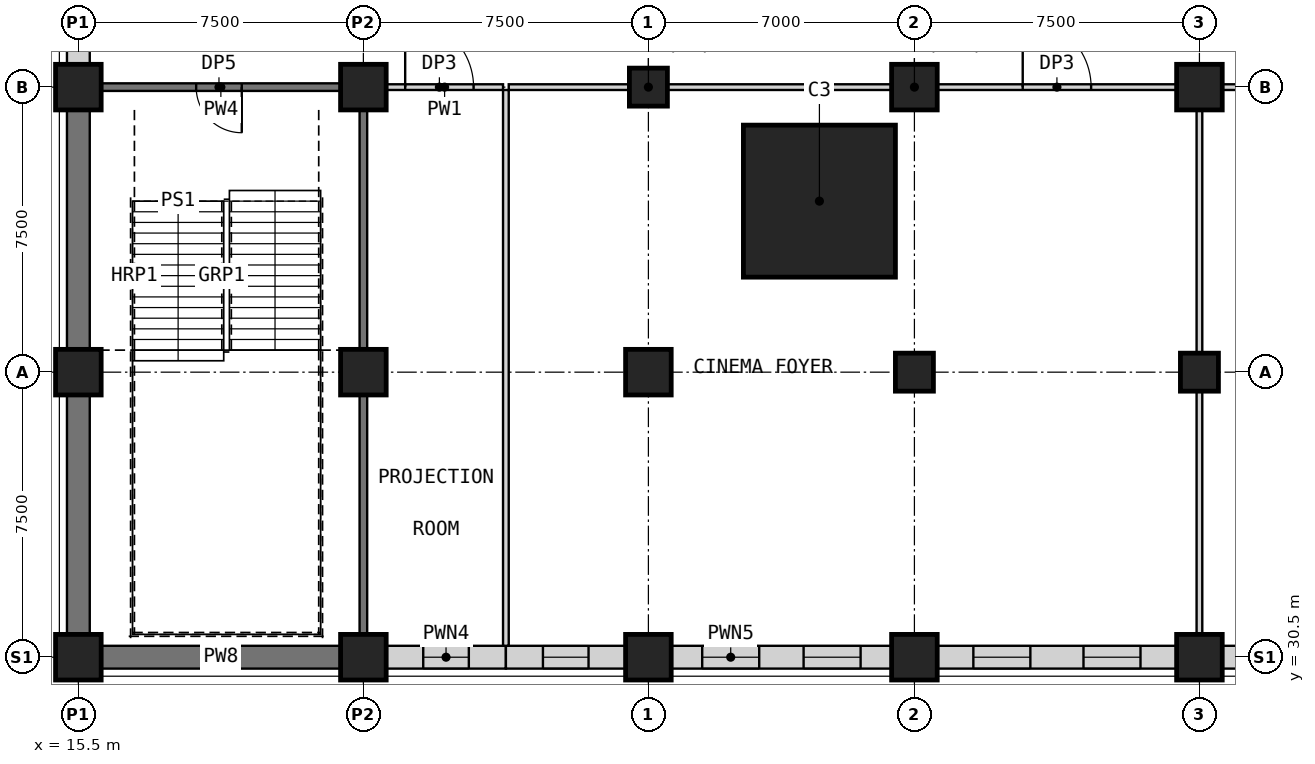
"""IFC4 building model, lengths in metres.
Left out: names, types, materials, properties, quantities, classifications, styles, units other than length and angle.
Written with IfcOpenShell. Run it as: python <this file> out.ifc"""

import sys

from ifc_helpers import new_model, si_unit, direction, frame, frame_2d, origin, origin_2d, place, context, subcontext, project, spatial, rectangle, extrude, element, fill, save


model = new_model("IFC4")
c1 = context("Model", 3, precision=1e-05, world=origin(), true_north=direction((0.0, 1.0)))
c2 = subcontext(c1, "Body", "Model", "MODEL_VIEW")
j1 = project(units=[si_unit("LENGTHUNIT", "METRE"), si_unit("PLANEANGLEUNIT", "RADIAN")], contexts=[c1])
p1 = place(None, origin())
s1 = spatial("IfcSite", under=j1, at=p1, CompositionType="ELEMENT")
p2 = place(p1, origin())
s2 = spatial("IfcBuilding", under=s1, at=p2, CompositionType="ELEMENT")
p3 = place(p2, frame((0.0, 0.0, 18.5)))
s3 = spatial("IfcBuildingStorey", under=s2, at=p3, CompositionType="ELEMENT", Elevation=18.5)
for number, where, z_axis, x_axis in (
    (1, (30.5, 45.5, 0.0), (0.0, 0.0, 1.0), (1.0, 0.0, 0.0)),
    (2, (37.5, 38.0, 0.0), (0.0, 0.0, 1.0), (1.0, 0.0, 0.0)),
):
    element("IfcColumn", number, at=place(p3, frame(where, z_axis=z_axis, x_axis=x_axis)), inside=s3, PredefinedType="COLUMN", context=c2, shape_type="SweptSolid", body=[
        extrude(rectangle(XDim=1.0, YDim=1.0, at=origin_2d()), origin(), (0.0, 0.0, 1.0), 5.0),
    ])
p4 = place(p3, frame((37.5, 45.5, 0.0), z_axis=(0.0, 0.0, 1.0), x_axis=(1.0, 0.0, 0.0)))
e3 = element("IfcColumn", 3, at=p4, inside=s3, PredefinedType="COLUMN", context=c2, shape_type="SweptSolid", body=[
    extrude(rectangle(XDim=1.2, YDim=1.2, at=origin_2d()), origin(), (0.0, 0.0, 1.0), 5.0),
])
p5 = place(p3, frame((45.0, 38.0, 0.0), z_axis=(0.0, 0.0, 1.0), x_axis=(1.0, 0.0, 0.0)))
e4 = element("IfcColumn", 4, at=p5, inside=s3, PredefinedType="COLUMN", context=c2, shape_type="SweptSolid", body=[
    extrude(rectangle(XDim=1.0, YDim=1.0, at=origin_2d()), origin(), (0.0, 0.0, 1.0), 5.0),
])
p6 = place(p3, frame((45.0, 45.5, 0.0), z_axis=(0.0, 0.0, 1.0), x_axis=(1.0, 0.0, 0.0)))
e5 = element("IfcColumn", 5, at=p6, inside=s3, PredefinedType="COLUMN", context=c2, shape_type="SweptSolid", body=[
    extrude(rectangle(XDim=1.2, YDim=1.2, at=origin_2d()), origin(), (0.0, 0.0, 1.0), 5.0),
])
p7 = place(p3, frame((35.0, 42.5, 0.0), z_axis=(0.0, 0.0, 1.0), x_axis=(1.0, 0.0, 0.0)))
e6 = element("IfcColumn", 6, at=p7, inside=s3, PredefinedType="COLUMN", context=c2, shape_type="SweptSolid", body=[
    extrude(rectangle(XDim=4.0, YDim=4.0, at=origin_2d()), origin(), (0.0, 0.0, 1.0), 5.0),
])
for number, where, z_axis, x_axis in (
    (7, (15.5, 30.5, 0.0), (0.0, 0.0, 1.0), (1.0, 0.0, 0.0)),
    (8, (15.5, 38.0, 0.0), (0.0, 0.0, 1.0), (1.0, 0.0, 0.0)),
    (9, (15.5, 45.5, 0.0), (0.0, 0.0, 1.0), (1.0, 0.0, 0.0)),
    (10, (23.0, 30.5, 0.0), (0.0, 0.0, 1.0), (1.0, 0.0, 0.0)),
    (11, (23.0, 38.0, 0.0), (0.0, 0.0, 1.0), (1.0, 0.0, 0.0)),
    (12, (23.0, 45.5, 0.0), (0.0, 0.0, 1.0), (1.0, 0.0, 0.0)),
    (13, (30.5, 30.5, 0.0), (0.0, 0.0, 1.0), (1.0, 0.0, 0.0)),
    (14, (30.5, 38.0, 0.0), (0.0, 0.0, 1.0), (1.0, 0.0, 0.0)),
    (15, (37.5, 30.5, 0.0), (0.0, 0.0, 1.0), (1.0, 0.0, 0.0)),
    (16, (45.0, 30.5, 0.0), (0.0, 0.0, 1.0), (1.0, 0.0, 0.0)),
):
    element("IfcColumn", number, at=place(p3, frame(where, z_axis=z_axis, x_axis=x_axis)), inside=s3, PredefinedType="COLUMN", context=c2, shape_type="SweptSolid", body=[
        extrude(rectangle(XDim=1.2, YDim=1.2, at=origin_2d()), origin(), (0.0, 0.0, 1.0), 5.0),
    ])
p8 = place(p3, frame((16.1, 30.5, 0.0), z_axis=(0.0, 0.0, 1.0), x_axis=(1.0, 0.0, 0.0)))
e17 = element("IfcWall", 17, at=p8, inside=s3, PredefinedType="PARTITIONING", context=c2, shape_type="SweptSolid", body=[
    extrude(rectangle(XDim=6.3, YDim=0.6, at=frame_2d((3.15, 0.0))), origin(), (0.0, 0.0, 1.0), 4.1),
])
p9 = place(p3, frame((23.6, 30.5, 0.0), z_axis=(0.0, 0.0, 1.0), x_axis=(1.0, 0.0, 0.0)))
e18 = element("IfcWall", 18, at=p9, inside=s3, PredefinedType="PARTITIONING", context=c2, shape_type="SweptSolid", body=[
    extrude(rectangle(XDim=3.15, YDim=0.6, at=frame_2d((1.575, 0.0))), origin(), (0.0, 0.0, 1.0), 4.1),
])
p10 = place(p9, frame((0.975, 0.0, 0.9)))
e19 = element("IfcOpeningElement", 19, at=p10, cuts=e18, PredefinedType="OPENING", context=c2, shape_type="SweptSolid", body=[
    extrude(rectangle(XDim=1.2, YDim=2.8, at=frame_2d((0.6, 1.4))), frame((0.0, 0.31, 0.0), z_axis=(0.0, -1.0, 0.0), x_axis=(1.0, 0.0, 0.0)), (0.0, 0.0, 1.0), 0.62),
])
p11 = place(p3, frame((26.75, 30.5, 0.0), z_axis=(0.0, 0.0, 1.0), x_axis=(1.0, 0.0, 0.0)))
e20 = element("IfcWall", 20, at=p11, inside=s3, PredefinedType="PARTITIONING", context=c2, shape_type="SweptSolid", body=[
    extrude(rectangle(XDim=3.15, YDim=0.6, at=frame_2d((1.575, 0.0))), origin(), (0.0, 0.0, 1.0), 4.1),
])
p12 = place(p11, frame((0.975, 0.0, 0.9)))
e21 = element("IfcOpeningElement", 21, at=p12, cuts=e20, PredefinedType="OPENING", context=c2, shape_type="SweptSolid", body=[
    extrude(rectangle(XDim=1.2, YDim=2.8, at=frame_2d((0.6, 1.4))), frame((0.0, 0.31, 0.0), z_axis=(0.0, -1.0, 0.0), x_axis=(1.0, 0.0, 0.0)), (0.0, 0.0, 1.0), 0.62),
])
p13 = place(p3, frame((31.1, 30.5, 0.0), z_axis=(0.0, 0.0, 1.0), x_axis=(1.0, 0.0, 0.0)))
e22 = element("IfcWall", 22, at=p13, inside=s3, PredefinedType="PARTITIONING", context=c2, shape_type="SweptSolid", body=[
    extrude(rectangle(XDim=5.8, YDim=0.6, at=frame_2d((2.9, 0.0))), origin(), (0.0, 0.0, 1.0), 4.1),
])
p14 = place(p13, frame((0.816, 0.0, 0.9)))
e23 = element("IfcOpeningElement", 23, at=p14, cuts=e22, PredefinedType="OPENING", context=c2, shape_type="SweptSolid", body=[
    extrude(rectangle(XDim=1.5, YDim=2.8, at=frame_2d((0.75, 1.4))), frame((0.0, 0.31, 0.0), z_axis=(0.0, -1.0, 0.0), x_axis=(1.0, 0.0, 0.0)), (0.0, 0.0, 1.0), 0.62),
])
p15 = place(p13, frame((3.484, 0.0, 0.9)))
e24 = element("IfcOpeningElement", 24, at=p15, cuts=e22, PredefinedType="OPENING", context=c2, shape_type="SweptSolid", body=[
    extrude(rectangle(XDim=1.5, YDim=2.8, at=frame_2d((0.75, 1.4))), frame((0.0, 0.31, 0.0), z_axis=(0.0, -1.0, 0.0), x_axis=(1.0, 0.0, 0.0)), (0.0, 0.0, 1.0), 0.62),
])
p16 = place(p3, frame((38.1, 30.5, 0.0), z_axis=(0.0, 0.0, 1.0), x_axis=(1.0, 0.0, 0.0)))
e25 = element("IfcWall", 25, at=p16, inside=s3, PredefinedType="PARTITIONING", context=c2, shape_type="SweptSolid", body=[
    extrude(rectangle(XDim=6.3, YDim=0.6, at=frame_2d((3.15, 0.0))), origin(), (0.0, 0.0, 1.0), 4.1),
])
p17 = place(p16, frame((0.951, 0.0, 0.9)))
e26 = element("IfcOpeningElement", 26, at=p17, cuts=e25, PredefinedType="OPENING", context=c2, shape_type="SweptSolid", body=[
    extrude(rectangle(XDim=1.5, YDim=2.8, at=frame_2d((0.75, 1.4))), frame((0.0, 0.31, 0.0), z_axis=(0.0, -1.0, 0.0), x_axis=(1.0, 0.0, 0.0)), (0.0, 0.0, 1.0), 0.62),
])
p18 = place(p16, frame((3.849, 0.0, 0.9)))
e27 = element("IfcOpeningElement", 27, at=p18, cuts=e25, PredefinedType="OPENING", context=c2, shape_type="SweptSolid", body=[
    extrude(rectangle(XDim=1.5, YDim=2.8, at=frame_2d((0.75, 1.4))), frame((0.0, 0.31, 0.0), z_axis=(0.0, -1.0, 0.0), x_axis=(1.0, 0.0, 0.0)), (0.0, 0.0, 1.0), 0.62),
])
p19 = place(p3, frame((45.6, 30.5, 0.0), z_axis=(0.0, 0.0, 1.0), x_axis=(1.0, 0.0, 0.0)))
e28 = element("IfcWall", 28, at=p19, inside=s3, PredefinedType="PARTITIONING", context=c2, shape_type="SweptSolid", body=[
    extrude(rectangle(XDim=6.3, YDim=0.6, at=frame_2d((3.15, 0.0))), origin(), (0.0, 0.0, 1.0), 4.1),
])
p20 = place(p19, frame((0.951, 0.0, 0.9)))
e29 = element("IfcOpeningElement", 29, at=p20, cuts=e28, PredefinedType="OPENING", context=c2, shape_type="SweptSolid", body=[
    extrude(rectangle(XDim=1.5, YDim=2.8, at=frame_2d((0.75, 1.4))), frame((0.0, 0.31, 0.0), z_axis=(0.0, -1.0, 0.0), x_axis=(1.0, 0.0, 0.0)), (0.0, 0.0, 1.0), 0.62),
])
p21 = place(p19, frame((3.849, 0.0, 0.9)))
e30 = element("IfcOpeningElement", 30, at=p21, cuts=e28, PredefinedType="OPENING", context=c2, shape_type="SweptSolid", body=[
    extrude(rectangle(XDim=1.5, YDim=2.8, at=frame_2d((0.75, 1.4))), frame((0.0, 0.31, 0.0), z_axis=(0.0, -1.0, 0.0), x_axis=(1.0, 0.0, 0.0)), (0.0, 0.0, 1.0), 0.62),
])
p22 = place(p3, frame((22.4, 45.5, 0.0), z_axis=(0.0, 0.0, 1.0), x_axis=(-1.0, 0.0, 0.0)))
e31 = element("IfcWall", 31, at=p22, inside=s3, PredefinedType="SHEAR", context=c2, shape_type="SweptSolid", body=[
    extrude(rectangle(XDim=6.3, YDim=0.2, at=frame_2d((3.15, 0.0))), origin(), (0.0, 0.0, 1.0), 4.7),
])
p23 = place(p22, frame((2.6, 0.0, 0.0)))
e32 = element("IfcOpeningElement", 32, at=p23, cuts=e31, PredefinedType="OPENING", context=c2, shape_type="SweptSolid", body=[
    extrude(rectangle(XDim=1.2, YDim=2.1, at=frame_2d((0.6, 1.05))), frame((0.0, 0.11, 0.0), z_axis=(0.0, -1.0, 0.0), x_axis=(1.0, 0.0, 0.0)), (0.0, 0.0, 1.0), 0.22),
])
p24 = place(p3, frame((23.6, 45.5, 0.0), z_axis=(0.0, 0.0, 1.0), x_axis=(1.0, 0.0, 0.0)))
e33 = element("IfcWall", 33, at=p24, inside=s3, PredefinedType="PARTITIONING", context=c2, shape_type="SweptSolid", body=[
    extrude(rectangle(XDim=3.075, YDim=0.15, at=frame_2d((1.538, 0.0))), origin(), (0.0, 0.0, 1.0), 4.7),
])
p25 = place(p24, frame((0.5, 0.0, 0.0)))
e34 = element("IfcOpeningElement", 34, at=p25, cuts=e33, PredefinedType="OPENING", context=c2, shape_type="SweptSolid", body=[
    extrude(rectangle(XDim=1.8, YDim=2.4, at=frame_2d((0.9, 1.2))), frame((0.0, 0.085, 0.0), z_axis=(0.0, -1.0, 0.0), x_axis=(1.0, 0.0, 0.0)), (0.0, 0.0, 1.0), 0.17),
])
p26 = place(p3, frame((26.825, 45.5, 0.0), z_axis=(0.0, 0.0, 1.0), x_axis=(1.0, 0.0, 0.0)))
e35 = element("IfcWall", 35, at=p26, inside=s3, PredefinedType="PARTITIONING", context=c2, shape_type="SweptSolid", body=[
    extrude(rectangle(XDim=3.175, YDim=0.15, at=frame_2d((1.587, 0.0))), origin(), (0.0, 0.0, 1.0), 4.7),
])
p27 = place(p3, frame((31.0, 45.5, 0.0), z_axis=(0.0, 0.0, 1.0), x_axis=(1.0, 0.0, 0.0)))
e36 = element("IfcWall", 36, at=p27, inside=s3, PredefinedType="PARTITIONING", context=c2, shape_type="SweptSolid", body=[
    extrude(rectangle(XDim=5.9, YDim=0.15, at=frame_2d((2.95, 0.0))), origin(), (0.0, 0.0, 1.0), 4.7),
])
p28 = place(p3, frame((38.1, 45.5, 0.0), z_axis=(0.0, 0.0, 1.0), x_axis=(1.0, 0.0, 0.0)))
e37 = element("IfcWall", 37, at=p28, inside=s3, PredefinedType="PARTITIONING", context=c2, shape_type="SweptSolid", body=[
    extrude(rectangle(XDim=6.3, YDim=0.15, at=frame_2d((3.15, 0.0))), origin(), (0.0, 0.0, 1.0), 4.7),
])
p29 = place(p28, frame((2.25, 0.0, 0.0)))
e38 = element("IfcOpeningElement", 38, at=p29, cuts=e37, PredefinedType="OPENING", context=c2, shape_type="SweptSolid", body=[
    extrude(rectangle(XDim=1.8, YDim=2.4, at=frame_2d((0.9, 1.2))), frame((0.0, 0.085, 0.0), z_axis=(0.0, -1.0, 0.0), x_axis=(1.0, 0.0, 0.0)), (0.0, 0.0, 1.0), 0.17),
])
p30 = place(p3, frame((45.6, 45.5, 0.0), z_axis=(0.0, 0.0, 1.0), x_axis=(1.0, 0.0, 0.0)))
e39 = element("IfcWall", 39, at=p30, inside=s3, PredefinedType="PARTITIONING", context=c2, shape_type="SweptSolid", body=[
    extrude(rectangle(XDim=6.3, YDim=0.15, at=frame_2d((3.15, 0.0))), origin(), (0.0, 0.0, 1.0), 4.7),
])
p31 = place(p30, frame((4.0, 0.0, 0.0)))
e40 = element("IfcOpeningElement", 40, at=p31, cuts=e39, PredefinedType="OPENING", context=c2, shape_type="SweptSolid", body=[
    extrude(rectangle(XDim=1.8, YDim=2.4, at=frame_2d((0.9, 1.2))), frame((0.0, 0.085, 0.0), z_axis=(0.0, -1.0, 0.0), x_axis=(1.0, 0.0, 0.0)), (0.0, 0.0, 1.0), 0.17),
])
for number, where, z_axis, x_axis in (
    (41, (15.5, 31.1, 0.0), (0.0, 0.0, 1.0), (0.0, 1.0, 0.0)),
    (42, (15.5, 38.6, 0.0), (0.0, 0.0, 1.0), (0.0, 1.0, 0.0)),
):
    element("IfcWall", number, at=place(p3, frame(where, z_axis=z_axis, x_axis=x_axis)), inside=s3, PredefinedType="PARTITIONING", context=c2, shape_type="SweptSolid", body=[
        extrude(rectangle(XDim=6.3, YDim=0.6, at=frame_2d((3.15, 0.0))), origin(), (0.0, 0.0, 1.0), 4.1),
    ])
p32 = place(p3, frame((15.5, 46.1, 0.0), z_axis=(0.0, 0.0, 1.0), x_axis=(0.0, 1.0, 0.0)))
e43 = element("IfcWall", 43, at=p32, inside=s3, PredefinedType="PARTITIONING", context=c2, shape_type="SweptSolid", body=[
    extrude(rectangle(XDim=5.8, YDim=0.6, at=frame_2d((2.9, 0.0))), origin(), (0.0, 0.0, 1.0), 4.1),
])
p33 = place(p32, frame((0.816, 0.0, 0.9)))
e44 = element("IfcOpeningElement", 44, at=p33, cuts=e43, PredefinedType="OPENING", context=c2, shape_type="SweptSolid", body=[
    extrude(rectangle(XDim=1.5, YDim=2.8, at=frame_2d((0.75, 1.4))), frame((0.0, 0.31, 0.0), z_axis=(0.0, -1.0, 0.0), x_axis=(1.0, 0.0, 0.0)), (0.0, 0.0, 1.0), 0.62),
])
p34 = place(p32, frame((3.484, 0.0, 0.9)))
e45 = element("IfcOpeningElement", 45, at=p34, cuts=e43, PredefinedType="OPENING", context=c2, shape_type="SweptSolid", body=[
    extrude(rectangle(XDim=1.5, YDim=2.8, at=frame_2d((0.75, 1.4))), frame((0.0, 0.31, 0.0), z_axis=(0.0, -1.0, 0.0), x_axis=(1.0, 0.0, 0.0)), (0.0, 0.0, 1.0), 0.62),
])
for number, where, z_axis, x_axis in (
    (46, (23.0, 31.1, 0.0), (0.0, 0.0, 1.0), (0.0, 1.0, 0.0)),
    (47, (23.0, 38.6, 0.0), (0.0, 0.0, 1.0), (0.0, 1.0, 0.0)),
):
    element("IfcWall", number, at=place(p3, frame(where, z_axis=z_axis, x_axis=x_axis)), inside=s3, PredefinedType="SHEAR", context=c2, shape_type="SweptSolid", body=[
        extrude(rectangle(XDim=6.3, YDim=0.2, at=frame_2d((3.15, 0.0))), origin(), (0.0, 0.0, 1.0), 4.7),
    ])
p35 = place(p3, frame((26.75, 30.8, 0.0), z_axis=(0.0, 0.0, 1.0), x_axis=(0.0, 1.0, 0.0)))
e48 = element("IfcWall", 48, at=p35, inside=s3, PredefinedType="PARTITIONING", context=c2, shape_type="SweptSolid", body=[
    extrude(rectangle(XDim=14.625, YDim=0.15, at=frame_2d((7.312, 0.0))), origin(), (0.0, 0.0, 1.0), 4.7),
])
for number, where, z_axis, x_axis in (
    (49, (45.0, 31.1, 0.0), (0.0, 0.0, 1.0), (0.0, 1.0, 0.0)),
    (50, (45.0, 38.5, 0.0), (0.0, 0.0, 1.0), (0.0, 1.0, 0.0)),
):
    element("IfcWall", number, at=place(p3, frame(where, z_axis=z_axis, x_axis=x_axis)), inside=s3, PredefinedType="PARTITIONING", context=c2, shape_type="SweptSolid", body=[
        extrude(rectangle(XDim=6.4, YDim=0.15, at=frame_2d((3.2, 0.0))), origin(), (0.0, 0.0, 1.0), 4.7),
    ])
p36 = place(p10, origin())
e51 = element("IfcWindow", 51, at=p36, inside=s3, PartitioningType="SINGLE_PANEL", PredefinedType="WINDOW", context=c2, shape_type="SweptSolid", body=[
    extrude(rectangle(XDim=1.2, YDim=2.8, at=frame_2d((0.6, 1.4))), frame((0.0, 0.03, 0.0), z_axis=(0.0, -1.0, 0.0), x_axis=(1.0, 0.0, 0.0)), (0.0, 0.0, 1.0), 0.06),
])
fill(e19, e51)
p37 = place(p12, origin())
e52 = element("IfcWindow", 52, at=p37, inside=s3, PartitioningType="SINGLE_PANEL", PredefinedType="WINDOW", context=c2, shape_type="SweptSolid", body=[
    extrude(rectangle(XDim=1.2, YDim=2.8, at=frame_2d((0.6, 1.4))), frame((0.0, 0.03, 0.0), z_axis=(0.0, -1.0, 0.0), x_axis=(1.0, 0.0, 0.0)), (0.0, 0.0, 1.0), 0.06),
])
fill(e21, e52)
p38 = place(p14, origin())
e53 = element("IfcWindow", 53, at=p38, inside=s3, PartitioningType="SINGLE_PANEL", PredefinedType="WINDOW", context=c2, shape_type="SweptSolid", body=[
    extrude(rectangle(XDim=1.5, YDim=2.8, at=frame_2d((0.75, 1.4))), frame((0.0, 0.03, 0.0), z_axis=(0.0, -1.0, 0.0), x_axis=(1.0, 0.0, 0.0)), (0.0, 0.0, 1.0), 0.06),
])
fill(e23, e53)
p39 = place(p15, origin())
e54 = element("IfcWindow", 54, at=p39, inside=s3, PartitioningType="SINGLE_PANEL", PredefinedType="WINDOW", context=c2, shape_type="SweptSolid", body=[
    extrude(rectangle(XDim=1.5, YDim=2.8, at=frame_2d((0.75, 1.4))), frame((0.0, 0.03, 0.0), z_axis=(0.0, -1.0, 0.0), x_axis=(1.0, 0.0, 0.0)), (0.0, 0.0, 1.0), 0.06),
])
fill(e24, e54)
p40 = place(p17, origin())
e55 = element("IfcWindow", 55, at=p40, inside=s3, PartitioningType="SINGLE_PANEL", PredefinedType="WINDOW", context=c2, shape_type="SweptSolid", body=[
    extrude(rectangle(XDim=1.5, YDim=2.8, at=frame_2d((0.75, 1.4))), frame((0.0, 0.03, 0.0), z_axis=(0.0, -1.0, 0.0), x_axis=(1.0, 0.0, 0.0)), (0.0, 0.0, 1.0), 0.06),
])
fill(e26, e55)
p41 = place(p18, origin())
e56 = element("IfcWindow", 56, at=p41, inside=s3, PartitioningType="SINGLE_PANEL", PredefinedType="WINDOW", context=c2, shape_type="SweptSolid", body=[
    extrude(rectangle(XDim=1.5, YDim=2.8, at=frame_2d((0.75, 1.4))), frame((0.0, 0.03, 0.0), z_axis=(0.0, -1.0, 0.0), x_axis=(1.0, 0.0, 0.0)), (0.0, 0.0, 1.0), 0.06),
])
fill(e27, e56)
p42 = place(p23, origin())
e57 = element("IfcDoor", 57, at=p42, inside=s3, OperationType="SINGLE_SWING_LEFT", PredefinedType="DOOR", context=c2, shape_type="SweptSolid", body=[
    extrude(rectangle(XDim=1.2, YDim=2.1, at=frame_2d((0.6, 1.05))), frame((0.0, 0.025, 0.0), z_axis=(0.0, -1.0, 0.0), x_axis=(1.0, 0.0, 0.0)), (0.0, 0.0, 1.0), 0.05),
])
fill(e32, e57)
p43 = place(p25, origin())
e58 = element("IfcDoor", 58, at=p43, inside=s3, OperationType="SINGLE_SWING_LEFT", PredefinedType="DOOR", context=c2, shape_type="SweptSolid", body=[
    extrude(rectangle(XDim=1.8, YDim=2.4, at=frame_2d((0.9, 1.2))), frame((0.0, 0.025, 0.0), z_axis=(0.0, -1.0, 0.0), x_axis=(1.0, 0.0, 0.0)), (0.0, 0.0, 1.0), 0.05),
])
fill(e34, e58)
p44 = place(p29, origin())
e59 = element("IfcDoor", 59, at=p44, inside=s3, OperationType="SINGLE_SWING_LEFT", PredefinedType="DOOR", context=c2, shape_type="SweptSolid", body=[
    extrude(rectangle(XDim=1.8, YDim=2.4, at=frame_2d((0.9, 1.2))), frame((0.0, 0.025, 0.0), z_axis=(0.0, -1.0, 0.0), x_axis=(1.0, 0.0, 0.0)), (0.0, 0.0, 1.0), 0.05),
])
fill(e38, e59)
save(model, sys.argv[1])
